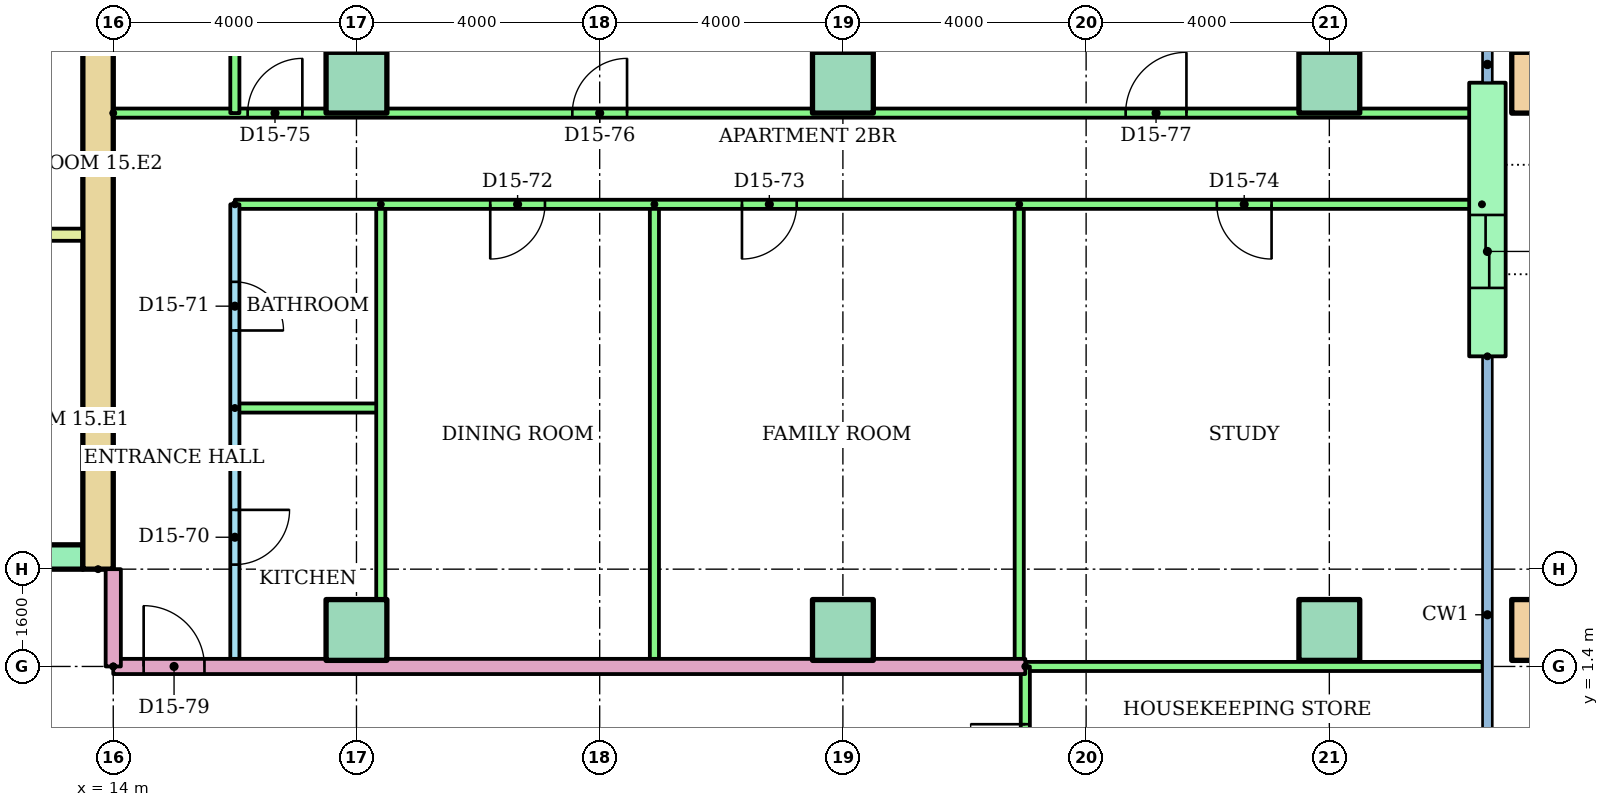
"""IFC4 building model, lengths in metres.
Left out: names, types, materials, properties, quantities, classifications, styles, units other than length and angle.
Written with IfcOpenShell. Run it as: python <this file> out.ifc"""

import sys

from ifc_helpers import new_model, si_unit, direction, frame, frame_2d, origin, origin_2d, place, context, subcontext, project, spatial, rectangle, hollow_rectangle, extrude, element, fill, save


model = new_model("IFC4")
c1 = context("Model", 3, precision=1e-05, world=origin(), true_north=direction((0.0, 1.0)))
c2 = subcontext(c1, "Body", "Model", "MODEL_VIEW")
j1 = project(units=[si_unit("LENGTHUNIT", "METRE"), si_unit("PLANEANGLEUNIT", "RADIAN")], contexts=[c1])
p1 = place(None, origin())
s1 = spatial("IfcSite", under=j1, at=p1, CompositionType="ELEMENT")
p2 = place(p1, origin())
s2 = spatial("IfcBuilding", under=s1, at=p2, CompositionType="ELEMENT")
p3 = place(p2, frame((0.0, 0.0, 57.6)))
s3 = spatial("IfcBuildingStorey", under=s2, at=p3, CompositionType="ELEMENT", Elevation=57.6)
for number, where in (
    (1, (18.0, 2.0, 0.0)),
    (2, (26.0, 2.0, 0.0)),
    (3, (34.0, 2.0, 0.0)),
):
    element("IfcColumn", number, at=place(p3, frame(where)), inside=s3, PredefinedType="COLUMN", context=c2, shape_type="SweptSolid", body=[
        extrude(rectangle(XDim=1.0, YDim=1.0, at=origin_2d()), origin(), (0.0, 0.0, 1.0), 3.2),
    ])
p4 = place(p3, frame((37.5, 2.0, 0.0)))
e4 = element("IfcColumn", 4, at=p4, inside=s3, PredefinedType="COLUMN", context=c2, shape_type="SweptSolid", body=[
    extrude(hollow_rectangle(XDim=1.0, YDim=1.0, WallThickness=0.05, at=origin_2d()), origin(), (0.0, 0.0, 1.0), 3.2),
])
for number, where in (
    (5, (18.0, 11.0, 0.0)),
    (6, (26.0, 11.0, 0.0)),
    (7, (34.0, 11.0, 0.0)),
):
    element("IfcColumn", number, at=place(p3, frame(where)), inside=s3, PredefinedType="COLUMN", context=c2, shape_type="SweptSolid", body=[
        extrude(rectangle(XDim=1.0, YDim=1.0, at=origin_2d()), origin(), (0.0, 0.0, 1.0), 3.2),
    ])
p5 = place(p3, frame((37.5, 11.0, 0.0)))
e8 = element("IfcColumn", 8, at=p5, inside=s3, PredefinedType="COLUMN", context=c2, shape_type="SweptSolid", body=[
    extrude(hollow_rectangle(XDim=1.0, YDim=1.0, WallThickness=0.05, at=origin_2d()), origin(), (0.0, 0.0, 1.0), 3.2),
])
p6 = place(p3, frame((36.6, 6.5, 0.0), z_axis=(0.0, 0.0, 1.0), x_axis=(0.0, 1.0, 0.0)))
e9 = element("IfcWall", 9, at=p6, inside=s3, PredefinedType="STANDARD", context=c2, shape_type="SweptSolid", body=[
    extrude(rectangle(XDim=4.5, YDim=0.6, at=frame_2d((2.25, 0.0))), origin(), (0.0, 0.0, 1.0), 2.92),
])
p7 = place(p6, frame((1.125, 0.0, 0.0)))
e10 = element("IfcOpeningElement", 10, at=p7, cuts=e9, PredefinedType="OPENING", context=c2, shape_type="SweptSolid", body=[
    extrude(rectangle(XDim=1.2, YDim=2.1, at=frame_2d((0.6, 1.05))), frame((0.0, 0.31, 0.0), z_axis=(0.0, -1.0, 0.0), x_axis=(1.0, 0.0, 0.0)), (0.0, 0.0, 1.0), 0.62),
])
p8 = place(p3, frame((13.75, 3.0, 0.0), z_axis=(0.0, 0.0, 1.0), x_axis=(0.0, 1.0, 0.0)))
e11 = element("IfcWall", 11, at=p8, inside=s3, PredefinedType="SHEAR", context=c2, shape_type="SweptSolid", body=[
    extrude(rectangle(XDim=17.0, YDim=0.5, at=frame_2d((8.5, 0.0))), origin(), (0.0, 0.0, 1.0), 2.92),
])
p9 = place(p3, frame((-13.5, 3.2, 0.0)))
e12 = element("IfcWall", 12, at=p9, inside=s3, PredefinedType="SHEAR", context=c2, shape_type="SweptSolid", body=[
    extrude(rectangle(XDim=27.0, YDim=0.4, at=frame_2d((13.5, 0.0))), origin(), (0.0, 0.0, 1.0), 2.92),
])
p10 = place(p9, frame((6.861, 0.0, 0.0)))
e13 = element("IfcOpeningElement", 13, at=p10, cuts=e12, PredefinedType="OPENING", context=c2, shape_type="SweptSolid", body=[
    extrude(rectangle(XDim=1.1, YDim=2.1, at=frame_2d((0.55, 1.05))), frame((0.0, 0.21, 0.0), z_axis=(0.0, -1.0, 0.0), x_axis=(1.0, 0.0, 0.0)), (0.0, 0.0, 1.0), 0.42),
])
p11 = place(p9, frame((9.906, 0.0, 0.0)))
e14 = element("IfcOpeningElement", 14, at=p11, cuts=e12, PredefinedType="OPENING", context=c2, shape_type="SweptSolid", body=[
    extrude(rectangle(XDim=1.1, YDim=2.1, at=frame_2d((0.55, 1.05))), frame((0.0, 0.21, 0.0), z_axis=(0.0, -1.0, 0.0), x_axis=(1.0, 0.0, 0.0)), (0.0, 0.0, 1.0), 0.42),
])
p12 = place(p9, frame((15.994, 0.0, 0.0)))
e15 = element("IfcOpeningElement", 15, at=p12, cuts=e12, PredefinedType="OPENING", context=c2, shape_type="SweptSolid", body=[
    extrude(rectangle(XDim=1.1, YDim=2.1, at=frame_2d((0.55, 1.05))), frame((0.0, 0.21, 0.0), z_axis=(0.0, -1.0, 0.0), x_axis=(1.0, 0.0, 0.0)), (0.0, 0.0, 1.0), 0.42),
])
p13 = place(p9, frame((19.039, 0.0, 0.0)))
e16 = element("IfcOpeningElement", 16, at=p13, cuts=e12, PredefinedType="OPENING", context=c2, shape_type="SweptSolid", body=[
    extrude(rectangle(XDim=1.1, YDim=2.1, at=frame_2d((0.55, 1.05))), frame((0.0, 0.21, 0.0), z_axis=(0.0, -1.0, 0.0), x_axis=(1.0, 0.0, 0.0)), (0.0, 0.0, 1.0), 0.42),
])
p14 = place(p9, frame((12.6, 0.0, 0.0)))
e17 = element("IfcOpeningElement", 17, at=p14, cuts=e12, PredefinedType="OPENING", context=c2, shape_type="SweptSolid", body=[
    extrude(rectangle(XDim=1.8, YDim=2.1, at=frame_2d((0.9, 1.05))), frame((0.0, 0.21, 0.0), z_axis=(0.0, -1.0, 0.0), x_axis=(1.0, 0.0, 0.0)), (0.0, 0.0, 1.0), 0.42),
])
p15 = place(p3, frame((9.6, 8.5, 0.0)))
e18 = element("IfcWall", 18, at=p15, inside=s3, PredefinedType="PARTITIONING", context=c2, shape_type="SweptSolid", body=[
    extrude(rectangle(XDim=3.9, YDim=0.2, at=frame_2d((1.95, 0.0))), origin(), (0.0, 0.0, 1.0), 2.92),
])
p16 = place(p3, frame((16.0, 9.0, 0.0), z_axis=(0.0, 0.0, 1.0), x_axis=(0.0, -1.0, 0.0)))
e19 = element("IfcWall", 19, at=p16, inside=s3, PredefinedType="PARTITIONING", context=c2, shape_type="SweptSolid", body=[
    extrude(rectangle(XDim=7.6, YDim=0.15, at=frame_2d((3.8, 0.0))), origin(), (0.0, 0.0, 1.0), 2.4),
])
p17 = place(p16, frame((5.025, 0.0, 0.0)))
e20 = element("IfcOpeningElement", 20, at=p17, cuts=e19, PredefinedType="OPENING", context=c2, shape_type="SweptSolid", body=[
    extrude(rectangle(XDim=0.9, YDim=2.1, at=frame_2d((0.45, 1.05))), frame((0.0, 0.085, 0.0), z_axis=(0.0, -1.0, 0.0), x_axis=(1.0, 0.0, 0.0)), (0.0, 0.0, 1.0), 0.17),
])
p18 = place(p16, frame((1.275, 0.0, 0.0)))
e21 = element("IfcOpeningElement", 21, at=p18, cuts=e19, PredefinedType="OPENING", context=c2, shape_type="SweptSolid", body=[
    extrude(rectangle(XDim=0.8, YDim=2.1, at=frame_2d((0.4, 1.05))), frame((0.0, 0.085, 0.0), z_axis=(0.0, -1.0, 0.0), x_axis=(1.0, 0.0, 0.0)), (0.0, 0.0, 1.0), 0.17),
])
p19 = place(p3, frame((16.0, 5.65, 0.0)))
e22 = element("IfcWall", 22, at=p19, inside=s3, PredefinedType="PARTITIONING", context=c2, shape_type="SweptSolid", body=[
    extrude(rectangle(XDim=2.4, YDim=0.15, at=frame_2d((1.2, 0.0))), origin(), (0.0, 0.0, 1.0), 2.4),
])
for number, where, z_axis, x_axis in (
    (23, (18.4, 9.0, 0.0), (0.0, 0.0, 1.0), (0.0, -1.0, 0.0)),
    (24, (22.9, 9.0, 0.0), (0.0, 0.0, 1.0), (0.0, -1.0, 0.0)),
    (25, (28.9, 9.0, 0.0), (0.0, 0.0, 1.0), (0.0, -1.0, 0.0)),
):
    element("IfcWall", number, at=place(p3, frame(where, z_axis=z_axis, x_axis=x_axis)), inside=s3, PredefinedType="PARTITIONING", context=c2, shape_type="SweptSolid", body=[
        extrude(rectangle(XDim=7.6, YDim=0.15, at=frame_2d((3.8, 0.0))), origin(), (0.0, 0.0, 1.0), 2.4),
    ])
p20 = place(p3, frame((36.51, 9.0, 0.0), z_axis=(0.0, 0.0, 1.0), x_axis=(-1.0, 0.0, 0.0)))
e26 = element("IfcWall", 26, at=p20, inside=s3, PredefinedType="PARTITIONING", context=c2, shape_type="SweptSolid", body=[
    extrude(rectangle(XDim=20.51, YDim=0.15, at=frame_2d((10.255, 0.0))), origin(), (0.0, 0.0, 1.0), 2.4),
])
p21 = place(p20, frame((15.41, 0.0, 0.0)))
e27 = element("IfcOpeningElement", 27, at=p21, cuts=e26, PredefinedType="OPENING", context=c2, shape_type="SweptSolid", body=[
    extrude(rectangle(XDim=0.9, YDim=2.1, at=frame_2d((0.45, 1.05))), frame((0.0, 0.085, 0.0), z_axis=(0.0, -1.0, 0.0), x_axis=(1.0, 0.0, 0.0)), (0.0, 0.0, 1.0), 0.17),
])
p22 = place(p20, frame((11.27, 0.0, 0.0)))
e28 = element("IfcOpeningElement", 28, at=p22, cuts=e26, PredefinedType="OPENING", context=c2, shape_type="SweptSolid", body=[
    extrude(rectangle(XDim=0.9, YDim=2.1, at=frame_2d((0.45, 1.05))), frame((0.0, 0.085, 0.0), z_axis=(0.0, -1.0, 0.0), x_axis=(1.0, 0.0, 0.0)), (0.0, 0.0, 1.0), 0.17),
])
p23 = place(p20, frame((3.46, 0.0, 0.0)))
e29 = element("IfcOpeningElement", 29, at=p23, cuts=e26, PredefinedType="OPENING", context=c2, shape_type="SweptSolid", body=[
    extrude(rectangle(XDim=0.9, YDim=2.1, at=frame_2d((0.45, 1.05))), frame((0.0, 0.085, 0.0), z_axis=(0.0, -1.0, 0.0), x_axis=(1.0, 0.0, 0.0)), (0.0, 0.0, 1.0), 0.17),
])
p24 = place(p3, frame((14.0, 10.5, 0.0)))
e30 = element("IfcWall", 30, at=p24, inside=s3, PredefinedType="PARTITIONING", context=c2, shape_type="SweptSolid", body=[
    extrude(rectangle(XDim=22.51, YDim=0.15, at=frame_2d((11.255, 0.0))), origin(), (0.0, 0.0, 1.0), 2.4),
])
p25 = place(p24, frame((2.21, 0.0, 0.0)))
e31 = element("IfcOpeningElement", 31, at=p25, cuts=e30, PredefinedType="OPENING", context=c2, shape_type="SweptSolid", body=[
    extrude(rectangle(XDim=0.9, YDim=2.1, at=frame_2d((0.45, 1.05))), frame((0.0, 0.085, 0.0), z_axis=(0.0, -1.0, 0.0), x_axis=(1.0, 0.0, 0.0)), (0.0, 0.0, 1.0), 0.17),
])
p26 = place(p24, frame((7.55, 0.0, 0.0)))
e32 = element("IfcOpeningElement", 32, at=p26, cuts=e30, PredefinedType="OPENING", context=c2, shape_type="SweptSolid", body=[
    extrude(rectangle(XDim=0.9, YDim=2.1, at=frame_2d((0.45, 1.05))), frame((0.0, 0.085, 0.0), z_axis=(0.0, -1.0, 0.0), x_axis=(1.0, 0.0, 0.0)), (0.0, 0.0, 1.0), 0.17),
])
p27 = place(p24, frame((16.65, 0.0, 0.0)))
e33 = element("IfcOpeningElement", 33, at=p27, cuts=e30, PredefinedType="OPENING", context=c2, shape_type="SweptSolid", body=[
    extrude(rectangle(XDim=1.0, YDim=2.1, at=frame_2d((0.5, 1.05))), frame((0.0, 0.085, 0.0), z_axis=(0.0, -1.0, 0.0), x_axis=(1.0, 0.0, 0.0)), (0.0, 0.0, 1.0), 0.17),
])
for number, where, z_axis, x_axis in (
    (34, (18.0, 18.521, 0.0), (0.0, 0.0, 1.0), (0.0, -1.0, 0.0)),
    (35, (26.0, 18.521, 0.0), (0.0, 0.0, 1.0), (0.0, -1.0, 0.0)),
):
    element("IfcWall", number, at=place(p3, frame(where, z_axis=z_axis, x_axis=x_axis)), inside=s3, PredefinedType="PARTITIONING", context=c2, shape_type="SweptSolid", body=[
        extrude(rectangle(XDim=8.021, YDim=0.15, at=frame_2d((4.01, 0.0))), origin(), (0.0, 0.0, 1.0), 2.4),
    ])
p28 = place(p3, frame((16.0, 12.8, 0.0), z_axis=(0.0, 0.0, 1.0), x_axis=(0.0, -1.0, 0.0)))
e36 = element("IfcWall", 36, at=p28, inside=s3, PredefinedType="PARTITIONING", context=c2, shape_type="SweptSolid", body=[
    extrude(rectangle(XDim=2.3, YDim=0.15, at=frame_2d((1.15, 0.0))), origin(), (0.0, 0.0, 1.0), 2.4),
])
p29 = place(p28, frame((0.24, 0.0, 0.0)))
e37 = element("IfcOpeningElement", 37, at=p29, cuts=e36, PredefinedType="OPENING", context=c2, shape_type="SweptSolid", body=[
    extrude(rectangle(XDim=0.8, YDim=2.1, at=frame_2d((0.4, 1.05))), frame((0.0, 0.085, 0.0), z_axis=(0.0, -1.0, 0.0), x_axis=(1.0, 0.0, 0.0)), (0.0, 0.0, 1.0), 0.17),
])
p30 = place(p3, frame((14.0, 1.4, 0.0)))
e38 = element("IfcWall", 38, at=p30, inside=s3, PredefinedType="PARTITIONING", context=c2, shape_type="SweptSolid", body=[
    extrude(rectangle(XDim=15.0, YDim=0.25, at=frame_2d((7.5, 0.0))), origin(), (0.0, 0.0, 1.0), 2.4),
])
p31 = place(p30, frame((0.5, 0.0, 0.0)))
e39 = element("IfcOpeningElement", 39, at=p31, cuts=e38, PredefinedType="OPENING", context=c2, shape_type="SweptSolid", body=[
    extrude(rectangle(XDim=1.0, YDim=2.1, at=frame_2d((0.5, 1.05))), frame((0.0, 0.135, 0.0), z_axis=(0.0, -1.0, 0.0), x_axis=(1.0, 0.0, 0.0)), (0.0, 0.0, 1.0), 0.27),
])
p32 = place(p3, frame((29.0, 1.4, 0.0)))
e40 = element("IfcWall", 40, at=p32, inside=s3, PredefinedType="PARTITIONING", context=c2, shape_type="SweptSolid", body=[
    extrude(rectangle(XDim=7.52, YDim=0.15, at=frame_2d((3.76, 0.0))), origin(), (0.0, 0.0, 1.0), 2.4),
])
p33 = place(p3, frame((29.0, -1.4, 0.0), z_axis=(0.0, 0.0, 1.0), x_axis=(0.0, 1.0, 0.0)))
e41 = element("IfcWall", 41, at=p33, inside=s3, PredefinedType="PARTITIONING", context=c2, shape_type="SweptSolid", body=[
    extrude(rectangle(XDim=2.8, YDim=0.15, at=frame_2d((1.4, 0.0))), origin(), (0.0, 0.0, 1.0), 2.4),
])
p34 = place(p33, frame((0.95, 0.0, 0.0)))
e42 = element("IfcOpeningElement", 42, at=p34, cuts=e41, PredefinedType="OPENING", context=c2, shape_type="SweptSolid", body=[
    extrude(rectangle(XDim=0.9, YDim=2.1, at=frame_2d((0.45, 1.05))), frame((0.0, 0.085, 0.0), z_axis=(0.0, -1.0, 0.0), x_axis=(1.0, 0.0, 0.0)), (0.0, 0.0, 1.0), 0.17),
])
p35 = place(p3, frame((14.0, 1.4, 0.0), z_axis=(0.0, 0.0, 1.0), x_axis=(0.0, 1.0, 0.0)))
e43 = element("IfcWall", 43, at=p35, inside=s3, PredefinedType="PARTITIONING", context=c2, shape_type="SweptSolid", body=[
    extrude(rectangle(XDim=1.6, YDim=0.25, at=frame_2d((0.8, 0.0))), origin(), (0.0, 0.0, 1.0), 2.4),
])
p36 = place(p17, origin())
e44 = element("IfcDoor", 44, at=p36, inside=s3, OperationType="SINGLE_SWING_LEFT", PredefinedType="DOOR", context=c2, shape_type="SweptSolid", body=[
    extrude(rectangle(XDim=0.9, YDim=2.1, at=frame_2d((0.45, 1.05))), frame((0.0, 0.025, 0.0), z_axis=(0.0, -1.0, 0.0), x_axis=(1.0, 0.0, 0.0)), (0.0, 0.0, 1.0), 0.05),
])
fill(e20, e44)
p37 = place(p18, origin())
e45 = element("IfcDoor", 45, at=p37, inside=s3, OperationType="SINGLE_SWING_RIGHT", PredefinedType="DOOR", context=c2, shape_type="SweptSolid", body=[
    extrude(rectangle(XDim=0.8, YDim=2.1, at=frame_2d((0.4, 1.05))), frame((0.0, 0.025, 0.0), z_axis=(0.0, -1.0, 0.0), x_axis=(1.0, 0.0, 0.0)), (0.0, 0.0, 1.0), 0.05),
])
fill(e21, e45)
p38 = place(p21, origin())
e46 = element("IfcDoor", 46, at=p38, inside=s3, OperationType="SINGLE_SWING_RIGHT", PredefinedType="DOOR", context=c2, shape_type="SweptSolid", body=[
    extrude(rectangle(XDim=0.9, YDim=2.1, at=frame_2d((0.45, 1.05))), frame((0.0, 0.025, 0.0), z_axis=(0.0, -1.0, 0.0), x_axis=(1.0, 0.0, 0.0)), (0.0, 0.0, 1.0), 0.05),
])
fill(e27, e46)
p39 = place(p22, origin())
e47 = element("IfcDoor", 47, at=p39, inside=s3, OperationType="SINGLE_SWING_RIGHT", PredefinedType="DOOR", context=c2, shape_type="SweptSolid", body=[
    extrude(rectangle(XDim=0.9, YDim=2.1, at=frame_2d((0.45, 1.05))), frame((0.0, 0.025, 0.0), z_axis=(0.0, -1.0, 0.0), x_axis=(1.0, 0.0, 0.0)), (0.0, 0.0, 1.0), 0.05),
])
fill(e28, e47)
p40 = place(p23, origin())
e48 = element("IfcDoor", 48, at=p40, inside=s3, OperationType="SINGLE_SWING_LEFT", PredefinedType="DOOR", context=c2, shape_type="SweptSolid", body=[
    extrude(rectangle(XDim=0.9, YDim=2.1, at=frame_2d((0.45, 1.05))), frame((0.0, 0.025, 0.0), z_axis=(0.0, -1.0, 0.0), x_axis=(1.0, 0.0, 0.0)), (0.0, 0.0, 1.0), 0.05),
])
fill(e29, e48)
p41 = place(p25, origin())
e49 = element("IfcDoor", 49, at=p41, inside=s3, OperationType="SINGLE_SWING_RIGHT", PredefinedType="DOOR", context=c2, shape_type="SweptSolid", body=[
    extrude(rectangle(XDim=0.9, YDim=2.1, at=frame_2d((0.45, 1.05))), frame((0.0, 0.025, 0.0), z_axis=(0.0, -1.0, 0.0), x_axis=(1.0, 0.0, 0.0)), (0.0, 0.0, 1.0), 0.05),
])
fill(e31, e49)
p42 = place(p26, origin())
e50 = element("IfcDoor", 50, at=p42, inside=s3, OperationType="SINGLE_SWING_RIGHT", PredefinedType="DOOR", context=c2, shape_type="SweptSolid", body=[
    extrude(rectangle(XDim=0.9, YDim=2.1, at=frame_2d((0.45, 1.05))), frame((0.0, 0.025, 0.0), z_axis=(0.0, -1.0, 0.0), x_axis=(1.0, 0.0, 0.0)), (0.0, 0.0, 1.0), 0.05),
])
fill(e32, e50)
p43 = place(p27, origin())
e51 = element("IfcDoor", 51, at=p43, inside=s3, OperationType="SINGLE_SWING_RIGHT", PredefinedType="DOOR", context=c2, shape_type="SweptSolid", body=[
    extrude(rectangle(XDim=1.0, YDim=2.1, at=frame_2d((0.5, 1.05))), frame((0.0, 0.025, 0.0), z_axis=(0.0, -1.0, 0.0), x_axis=(1.0, 0.0, 0.0)), (0.0, 0.0, 1.0), 0.05),
])
fill(e33, e51)
p44 = place(p31, origin())
e52 = element("IfcDoor", 52, at=p44, inside=s3, OperationType="SINGLE_SWING_LEFT", PredefinedType="DOOR", context=c2, shape_type="SweptSolid", body=[
    extrude(rectangle(XDim=1.0, YDim=2.1, at=frame_2d((0.5, 1.05))), frame((0.0, 0.025, 0.0), z_axis=(0.0, -1.0, 0.0), x_axis=(1.0, 0.0, 0.0)), (0.0, 0.0, 1.0), 0.05),
])
fill(e39, e52)
p45 = place(p34, origin())
e53 = element("IfcDoor", 53, at=p45, inside=s3, OperationType="SINGLE_SWING_RIGHT", PredefinedType="DOOR", context=c2, shape_type="SweptSolid", body=[
    extrude(rectangle(XDim=0.9, YDim=2.1, at=frame_2d((0.45, 1.05))), frame((0.0, 0.025, 0.0), z_axis=(0.0, -1.0, 0.0), x_axis=(1.0, 0.0, 0.0)), (0.0, 0.0, 1.0), 0.05),
])
fill(e42, e53)
p46 = place(p7, origin())
e54 = element("IfcDoor", 54, at=p46, inside=s3, OperationType="SLIDING_TO_LEFT", PredefinedType="DOOR", context=c2, shape_type="SweptSolid", body=[
    extrude(rectangle(XDim=1.2, YDim=2.1, at=frame_2d((0.6, 1.05))), frame((0.0, 0.025, 0.0), z_axis=(0.0, -1.0, 0.0), x_axis=(1.0, 0.0, 0.0)), (0.0, 0.0, 1.0), 0.05),
])
fill(e10, e54)
save(model, sys.argv[1])
